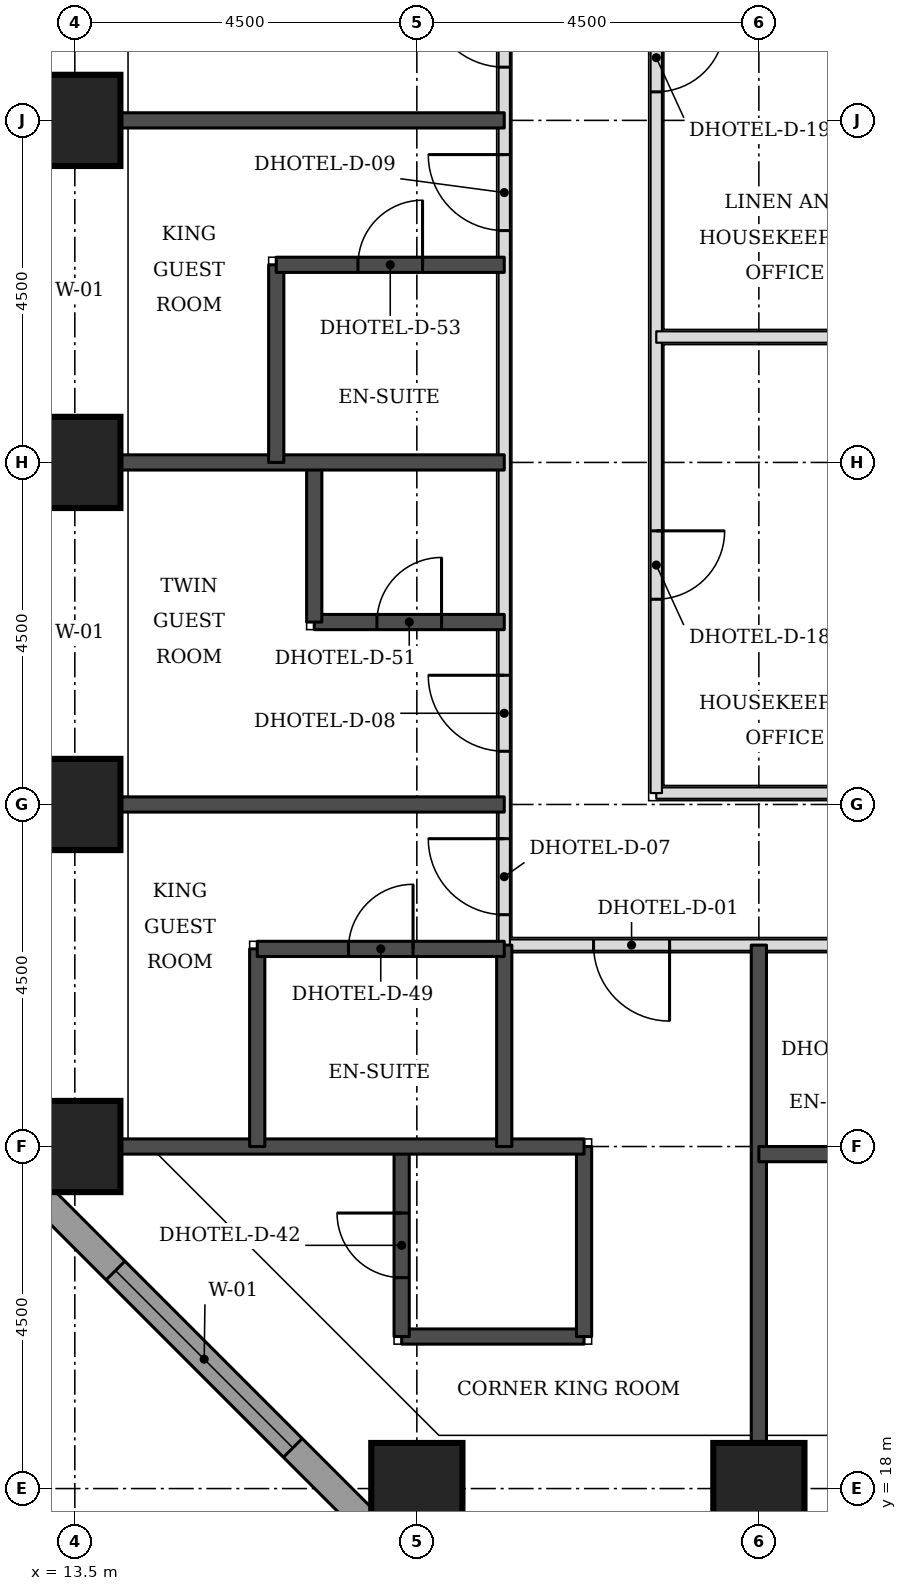
"""IFC4 building model, lengths in metres.
Left out: names, types, materials, properties, quantities, classifications, styles, units other than length and angle.
Written with IfcOpenShell. Run it as: python <this file> out.ifc"""

import sys

from ifc_helpers import new_model, si_unit, direction, frame, frame_2d, origin, origin_2d, place, context, subcontext, project, spatial, rectangle, extrude, element, fill, save


model = new_model("IFC4")
c1 = context("Model", 3, precision=1e-05, world=origin(), true_north=direction((0.0, 1.0)))
c2 = subcontext(c1, "Body", "Model", "MODEL_VIEW")
j1 = project(units=[si_unit("LENGTHUNIT", "METRE"), si_unit("PLANEANGLEUNIT", "RADIAN")], contexts=[c1])
p1 = place(None, origin())
s1 = spatial("IfcSite", under=j1, at=p1, CompositionType="ELEMENT")
p2 = place(p1, origin())
s2 = spatial("IfcBuilding", under=s1, at=p2, CompositionType="ELEMENT")
p3 = place(p2, frame((0.0, 0.0, 36.3)))
s3 = spatial("IfcBuildingStorey", under=s2, at=p3, CompositionType="ELEMENT", Elevation=36.3)
for number, where, z_axis, x_axis in (
    (1, (18.0, 18.0, 0.0), (0.0, 0.0, 1.0), (1.0, 0.0, 0.0)),
    (2, (22.5, 18.0, 0.0), (0.0, 0.0, 1.0), (1.0, 0.0, 0.0)),
    (3, (13.5, 22.5, 0.0), (0.0, 0.0, 1.0), (1.0, 0.0, 0.0)),
    (4, (13.5, 27.0, 0.0), (0.0, 0.0, 1.0), (1.0, 0.0, 0.0)),
    (5, (13.5, 31.5, 0.0), (0.0, 0.0, 1.0), (1.0, 0.0, 0.0)),
    (6, (13.5, 36.0, 0.0), (0.0, 0.0, 1.0), (1.0, 0.0, 0.0)),
):
    element("IfcColumn", number, at=place(p3, frame(where, z_axis=z_axis, x_axis=x_axis)), inside=s3, PredefinedType="COLUMN", context=c2, shape_type="SweptSolid", body=[
        extrude(rectangle(XDim=1.2, YDim=1.2, at=origin_2d()), origin(), (0.0, 0.0, 1.0), 3.3),
    ])
p4 = place(p3, frame((12.674, 22.23, 0.0), z_axis=(0.0, 0.0, 1.0), x_axis=(0.707106781187, -0.707106781187, 0.0)))
e7 = element("IfcWall", 7, at=p4, inside=s3, PredefinedType="STANDARD", context=c2, shape_type="SweptSolid", body=[
    extrude(rectangle(XDim=7.151, YDim=0.35, at=frame_2d((3.576, 0.0))), origin(), (0.0, 0.0, 1.0), 3.055),
])
p5 = place(p4, frame((1.926, 0.0, 0.8)))
e8 = element("IfcOpeningElement", 8, at=p5, cuts=e7, PredefinedType="OPENING", context=c2, shape_type="SweptSolid", body=[
    extrude(rectangle(XDim=3.3, YDim=1.5, at=frame_2d((1.65, 0.75))), frame((0.0, 0.185, 0.0), z_axis=(0.0, -1.0, 0.0), x_axis=(1.0, 0.0, 0.0)), (0.0, 0.0, 1.0), 0.37),
])
p6 = place(p3, frame((19.15, 25.15, 0.0), z_axis=(0.0, 0.0, 1.0), x_axis=(1.0, 0.0, 0.0)))
e9 = element("IfcWall", 9, at=p6, inside=s3, PredefinedType="PARTITIONING", context=c2, shape_type="SweptSolid", body=[
    extrude(rectangle(XDim=32.35, YDim=0.15, at=frame_2d((16.175, 0.0))), origin(), (0.0, 0.0, 1.0), 3.08),
])
p7 = place(p6, frame((6.4, 0.0, 0.0)))
e10 = element("IfcOpeningElement", 10, at=p7, cuts=e9, PredefinedType="OPENING", context=c2, shape_type="SweptSolid", body=[
    extrude(rectangle(XDim=1.0, YDim=2.1, at=frame_2d((0.5, 1.05))), frame((0.0, 0.085, 0.0), z_axis=(0.0, -1.0, 0.0), x_axis=(1.0, 0.0, 0.0)), (0.0, 0.0, 1.0), 0.17),
])
p8 = place(p6, frame((10.5, 0.0, 0.0)))
e11 = element("IfcOpeningElement", 11, at=p8, cuts=e9, PredefinedType="OPENING", context=c2, shape_type="SweptSolid", body=[
    extrude(rectangle(XDim=1.0, YDim=2.1, at=frame_2d((0.5, 1.05))), frame((0.0, 0.085, 0.0), z_axis=(0.0, -1.0, 0.0), x_axis=(1.0, 0.0, 0.0)), (0.0, 0.0, 1.0), 0.17),
])
p9 = place(p6, frame((22.45, 0.0, 0.0)))
e12 = element("IfcOpeningElement", 12, at=p9, cuts=e9, PredefinedType="OPENING", context=c2, shape_type="SweptSolid", body=[
    extrude(rectangle(XDim=1.0, YDim=2.1, at=frame_2d((0.5, 1.05))), frame((0.0, 0.085, 0.0), z_axis=(0.0, -1.0, 0.0), x_axis=(1.0, 0.0, 0.0)), (0.0, 0.0, 1.0), 0.17),
])
p10 = place(p6, frame((26.55, 0.0, 0.0)))
e13 = element("IfcOpeningElement", 13, at=p10, cuts=e9, PredefinedType="OPENING", context=c2, shape_type="SweptSolid", body=[
    extrude(rectangle(XDim=1.0, YDim=2.1, at=frame_2d((0.5, 1.05))), frame((0.0, 0.085, 0.0), z_axis=(0.0, -1.0, 0.0), x_axis=(1.0, 0.0, 0.0)), (0.0, 0.0, 1.0), 0.17),
])
p11 = place(p6, frame((1.175, 0.0, 0.0)))
e14 = element("IfcOpeningElement", 14, at=p11, cuts=e9, PredefinedType="OPENING", context=c2, shape_type="SweptSolid", body=[
    extrude(rectangle(XDim=1.0, YDim=2.1, at=frame_2d((0.5, 1.05))), frame((0.0, 0.085, 0.0), z_axis=(0.0, -1.0, 0.0), x_axis=(1.0, 0.0, 0.0)), (0.0, 0.0, 1.0), 0.17),
])
p12 = place(p6, frame((30.85, 0.0, 0.0)))
e15 = element("IfcOpeningElement", 15, at=p12, cuts=e9, PredefinedType="OPENING", context=c2, shape_type="SweptSolid", body=[
    extrude(rectangle(XDim=1.0, YDim=2.1, at=frame_2d((0.5, 1.05))), frame((0.0, 0.085, 0.0), z_axis=(0.0, -1.0, 0.0), x_axis=(1.0, 0.0, 0.0)), (0.0, 0.0, 1.0), 0.17),
])
p13 = place(p3, frame((19.15, 25.15, 0.0), z_axis=(0.0, 0.0, 1.0), x_axis=(0.0, 1.0, 0.0)))
e16 = element("IfcWall", 16, at=p13, inside=s3, PredefinedType="PARTITIONING", context=c2, shape_type="SweptSolid", body=[
    extrude(rectangle(XDim=24.35, YDim=0.15, at=frame_2d((12.175, 0.0))), origin(), (0.0, 0.0, 1.0), 3.08),
])
p14 = place(p13, frame((0.4, 0.0, 0.0)))
e17 = element("IfcOpeningElement", 17, at=p14, cuts=e16, PredefinedType="OPENING", context=c2, shape_type="SweptSolid", body=[
    extrude(rectangle(XDim=1.0, YDim=2.1, at=frame_2d((0.5, 1.05))), frame((0.0, 0.085, 0.0), z_axis=(0.0, -1.0, 0.0), x_axis=(1.0, 0.0, 0.0)), (0.0, 0.0, 1.0), 0.17),
])
p15 = place(p13, frame((2.55, 0.0, 0.0)))
e18 = element("IfcOpeningElement", 18, at=p15, cuts=e16, PredefinedType="OPENING", context=c2, shape_type="SweptSolid", body=[
    extrude(rectangle(XDim=1.0, YDim=2.1, at=frame_2d((0.5, 1.05))), frame((0.0, 0.085, 0.0), z_axis=(0.0, -1.0, 0.0), x_axis=(1.0, 0.0, 0.0)), (0.0, 0.0, 1.0), 0.17),
])
p16 = place(p13, frame((9.4, 0.0, 0.0)))
e19 = element("IfcOpeningElement", 19, at=p16, cuts=e16, PredefinedType="OPENING", context=c2, shape_type="SweptSolid", body=[
    extrude(rectangle(XDim=1.0, YDim=2.1, at=frame_2d((0.5, 1.05))), frame((0.0, 0.085, 0.0), z_axis=(0.0, -1.0, 0.0), x_axis=(1.0, 0.0, 0.0)), (0.0, 0.0, 1.0), 0.17),
])
p17 = place(p13, frame((11.55, 0.0, 0.0)))
e20 = element("IfcOpeningElement", 20, at=p17, cuts=e16, PredefinedType="OPENING", context=c2, shape_type="SweptSolid", body=[
    extrude(rectangle(XDim=1.0, YDim=2.1, at=frame_2d((0.5, 1.05))), frame((0.0, 0.085, 0.0), z_axis=(0.0, -1.0, 0.0), x_axis=(1.0, 0.0, 0.0)), (0.0, 0.0, 1.0), 0.17),
])
p18 = place(p13, frame((18.4, 0.0, 0.0)))
e21 = element("IfcOpeningElement", 21, at=p18, cuts=e16, PredefinedType="OPENING", context=c2, shape_type="SweptSolid", body=[
    extrude(rectangle(XDim=1.0, YDim=2.1, at=frame_2d((0.5, 1.05))), frame((0.0, 0.085, 0.0), z_axis=(0.0, -1.0, 0.0), x_axis=(1.0, 0.0, 0.0)), (0.0, 0.0, 1.0), 0.17),
])
p19 = place(p13, frame((20.55, 0.0, 0.0)))
e22 = element("IfcOpeningElement", 22, at=p19, cuts=e16, PredefinedType="OPENING", context=c2, shape_type="SweptSolid", body=[
    extrude(rectangle(XDim=1.0, YDim=2.1, at=frame_2d((0.5, 1.05))), frame((0.0, 0.085, 0.0), z_axis=(0.0, -1.0, 0.0), x_axis=(1.0, 0.0, 0.0)), (0.0, 0.0, 1.0), 0.17),
])
p20 = place(p3, frame((21.15, 27.15, 0.0), z_axis=(0.0, 0.0, 1.0), x_axis=(1.0, 0.0, 0.0)))
e23 = element("IfcWall", 23, at=p20, inside=s3, PredefinedType="PARTITIONING", context=c2, shape_type="SweptSolid", body=[
    extrude(rectangle(XDim=3.45, YDim=0.15, at=frame_2d((1.725, 0.0))), origin(), (0.0, 0.0, 1.0), 3.08),
])
p21 = place(p3, frame((21.15, 27.15, 0.0), z_axis=(0.0, 0.0, 1.0), x_axis=(0.0, 1.0, 0.0)))
e24 = element("IfcWall", 24, at=p21, inside=s3, PredefinedType="PARTITIONING", context=c2, shape_type="SweptSolid", body=[
    extrude(rectangle(XDim=15.85, YDim=0.15, at=frame_2d((7.925, 0.0))), origin(), (0.0, 0.0, 1.0), 3.08),
])
p22 = place(p21, frame((2.55, 0.0, 0.0)))
e25 = element("IfcOpeningElement", 25, at=p22, cuts=e24, PredefinedType="OPENING", context=c2, shape_type="SweptSolid", body=[
    extrude(rectangle(XDim=0.9, YDim=2.1, at=frame_2d((0.45, 1.05))), frame((0.0, 0.085, 0.0), z_axis=(0.0, -1.0, 0.0), x_axis=(1.0, 0.0, 0.0)), (0.0, 0.0, 1.0), 0.17),
])
p23 = place(p21, frame((9.225, 0.0, 0.0)))
e26 = element("IfcOpeningElement", 26, at=p23, cuts=e24, PredefinedType="OPENING", context=c2, shape_type="SweptSolid", body=[
    extrude(rectangle(XDim=0.9, YDim=2.1, at=frame_2d((0.45, 1.05))), frame((0.0, 0.085, 0.0), z_axis=(0.0, -1.0, 0.0), x_axis=(1.0, 0.0, 0.0)), (0.0, 0.0, 1.0), 0.17),
])
p24 = place(p3, frame((22.5, 18.6, 0.0), z_axis=(0.0, 0.0, 1.0), x_axis=(0.0, 1.0, 0.0)))
e27 = element("IfcWall", 27, at=p24, inside=s3, PredefinedType="SOLIDWALL", context=c2, shape_type="SweptSolid", body=[
    extrude(rectangle(XDim=6.55, YDim=0.2, at=frame_2d((3.275, 0.0))), origin(), (0.0, 0.0, 1.0), 3.08),
])
p25 = place(p3, frame((17.8, 20.0, 0.0), z_axis=(0.0, 0.0, 1.0), x_axis=(1.0, 0.0, 0.0)))
e28 = element("IfcWall", 28, at=p25, inside=s3, PredefinedType="SOLIDWALL", context=c2, shape_type="SweptSolid", body=[
    extrude(rectangle(XDim=2.4, YDim=0.2, at=frame_2d((1.2, 0.0))), origin(), (0.0, 0.0, 1.0), 3.08),
])
p26 = place(p3, frame((17.8, 20.0, 0.0), z_axis=(0.0, 0.0, 1.0), x_axis=(0.0, 1.0, 0.0)))
e29 = element("IfcWall", 29, at=p26, inside=s3, PredefinedType="SOLIDWALL", context=c2, shape_type="SweptSolid", body=[
    extrude(rectangle(XDim=2.5, YDim=0.2, at=frame_2d((1.25, 0.0))), origin(), (0.0, 0.0, 1.0), 3.08),
])
p27 = place(p26, frame((0.775, 0.0, 0.0)))
e30 = element("IfcOpeningElement", 30, at=p27, cuts=e29, PredefinedType="OPENING", context=c2, shape_type="SweptSolid", body=[
    extrude(rectangle(XDim=0.85, YDim=2.1, at=frame_2d((0.425, 1.05))), frame((0.0, 0.11, 0.0), z_axis=(0.0, -1.0, 0.0), x_axis=(1.0, 0.0, 0.0)), (0.0, 0.0, 1.0), 0.22),
])
p28 = place(p3, frame((20.2, 20.0, 0.0), z_axis=(0.0, 0.0, 1.0), x_axis=(0.0, 1.0, 0.0)))
e31 = element("IfcWall", 31, at=p28, inside=s3, PredefinedType="SOLIDWALL", context=c2, shape_type="SweptSolid", body=[
    extrude(rectangle(XDim=2.5, YDim=0.2, at=frame_2d((1.25, 0.0))), origin(), (0.0, 0.0, 1.0), 3.08),
])
p29 = place(p3, frame((22.5, 22.4, 0.0), z_axis=(0.0, 0.0, 1.0), x_axis=(1.0, 0.0, 0.0)))
e32 = element("IfcWall", 32, at=p29, inside=s3, PredefinedType="SOLIDWALL", context=c2, shape_type="SweptSolid", body=[
    extrude(rectangle(XDim=2.6, YDim=0.2, at=frame_2d((1.3, 0.0))), origin(), (0.0, 0.0, 1.0), 3.08),
])
p30 = place(p3, frame((14.1, 22.5, 0.0), z_axis=(0.0, 0.0, 1.0), x_axis=(1.0, 0.0, 0.0)))
e33 = element("IfcWall", 33, at=p30, inside=s3, PredefinedType="SOLIDWALL", context=c2, shape_type="SweptSolid", body=[
    extrude(rectangle(XDim=6.1, YDim=0.2, at=frame_2d((3.05, 0.0))), origin(), (0.0, 0.0, 1.0), 3.08),
])
p31 = place(p3, frame((15.9, 22.5, 0.0), z_axis=(0.0, 0.0, 1.0), x_axis=(0.0, 1.0, 0.0)))
e34 = element("IfcWall", 34, at=p31, inside=s3, PredefinedType="SOLIDWALL", context=c2, shape_type="SweptSolid", body=[
    extrude(rectangle(XDim=2.6, YDim=0.2, at=frame_2d((1.3, 0.0))), origin(), (0.0, 0.0, 1.0), 3.08),
])
p32 = place(p3, frame((19.15, 22.5, 0.0), z_axis=(0.0, 0.0, 1.0), x_axis=(0.0, 1.0, 0.0)))
e35 = element("IfcWall", 35, at=p32, inside=s3, PredefinedType="SOLIDWALL", context=c2, shape_type="SweptSolid", body=[
    extrude(rectangle(XDim=2.65, YDim=0.2, at=frame_2d((1.325, 0.0))), origin(), (0.0, 0.0, 1.0), 3.08),
])
p33 = place(p3, frame((15.9, 25.1, 0.0), z_axis=(0.0, 0.0, 1.0), x_axis=(1.0, 0.0, 0.0)))
e36 = element("IfcWall", 36, at=p33, inside=s3, PredefinedType="SOLIDWALL", context=c2, shape_type="SweptSolid", body=[
    extrude(rectangle(XDim=3.25, YDim=0.2, at=frame_2d((1.625, 0.0))), origin(), (0.0, 0.0, 1.0), 3.08),
])
p34 = place(p33, frame((1.2, 0.0, 0.0)))
e37 = element("IfcOpeningElement", 37, at=p34, cuts=e36, PredefinedType="OPENING", context=c2, shape_type="SweptSolid", body=[
    extrude(rectangle(XDim=0.85, YDim=2.1, at=frame_2d((0.425, 1.05))), frame((0.0, 0.11, 0.0), z_axis=(0.0, -1.0, 0.0), x_axis=(1.0, 0.0, 0.0)), (0.0, 0.0, 1.0), 0.22),
])
p35 = place(p3, frame((14.1, 27.0, 0.0), z_axis=(0.0, 0.0, 1.0), x_axis=(1.0, 0.0, 0.0)))
e38 = element("IfcWall", 38, at=p35, inside=s3, PredefinedType="SOLIDWALL", context=c2, shape_type="SweptSolid", body=[
    extrude(rectangle(XDim=5.05, YDim=0.2, at=frame_2d((2.525, 0.0))), origin(), (0.0, 0.0, 1.0), 3.08),
])
p36 = place(p3, frame((16.65, 29.4, 0.0), z_axis=(0.0, 0.0, 1.0), x_axis=(1.0, 0.0, 0.0)))
e39 = element("IfcWall", 39, at=p36, inside=s3, PredefinedType="SOLIDWALL", context=c2, shape_type="SweptSolid", body=[
    extrude(rectangle(XDim=2.5, YDim=0.2, at=frame_2d((1.25, 0.0))), origin(), (0.0, 0.0, 1.0), 3.08),
])
p37 = place(p36, frame((0.825, 0.0, 0.0)))
e40 = element("IfcOpeningElement", 40, at=p37, cuts=e39, PredefinedType="OPENING", context=c2, shape_type="SweptSolid", body=[
    extrude(rectangle(XDim=0.85, YDim=2.1, at=frame_2d((0.425, 1.05))), frame((0.0, 0.11, 0.0), z_axis=(0.0, -1.0, 0.0), x_axis=(1.0, 0.0, 0.0)), (0.0, 0.0, 1.0), 0.22),
])
p38 = place(p3, frame((16.65, 29.4, 0.0), z_axis=(0.0, 0.0, 1.0), x_axis=(0.0, 1.0, 0.0)))
e41 = element("IfcWall", 41, at=p38, inside=s3, PredefinedType="SOLIDWALL", context=c2, shape_type="SweptSolid", body=[
    extrude(rectangle(XDim=2.1, YDim=0.2, at=frame_2d((1.05, 0.0))), origin(), (0.0, 0.0, 1.0), 3.08),
])
p39 = place(p3, frame((14.1, 31.5, 0.0), z_axis=(0.0, 0.0, 1.0), x_axis=(1.0, 0.0, 0.0)))
e42 = element("IfcWall", 42, at=p39, inside=s3, PredefinedType="SOLIDWALL", context=c2, shape_type="SweptSolid", body=[
    extrude(rectangle(XDim=5.05, YDim=0.2, at=frame_2d((2.525, 0.0))), origin(), (0.0, 0.0, 1.0), 3.08),
])
p40 = place(p3, frame((16.15, 31.5, 0.0), z_axis=(0.0, 0.0, 1.0), x_axis=(0.0, 1.0, 0.0)))
e43 = element("IfcWall", 43, at=p40, inside=s3, PredefinedType="SOLIDWALL", context=c2, shape_type="SweptSolid", body=[
    extrude(rectangle(XDim=2.6, YDim=0.2, at=frame_2d((1.3, 0.0))), origin(), (0.0, 0.0, 1.0), 3.08),
])
p41 = place(p3, frame((16.15, 34.1, 0.0), z_axis=(0.0, 0.0, 1.0), x_axis=(1.0, 0.0, 0.0)))
e44 = element("IfcWall", 44, at=p41, inside=s3, PredefinedType="SOLIDWALL", context=c2, shape_type="SweptSolid", body=[
    extrude(rectangle(XDim=3.0, YDim=0.2, at=frame_2d((1.5, 0.0))), origin(), (0.0, 0.0, 1.0), 3.08),
])
p42 = place(p41, frame((1.075, 0.0, 0.0)))
e45 = element("IfcOpeningElement", 45, at=p42, cuts=e44, PredefinedType="OPENING", context=c2, shape_type="SweptSolid", body=[
    extrude(rectangle(XDim=0.85, YDim=2.1, at=frame_2d((0.425, 1.05))), frame((0.0, 0.11, 0.0), z_axis=(0.0, -1.0, 0.0), x_axis=(1.0, 0.0, 0.0)), (0.0, 0.0, 1.0), 0.22),
])
p43 = place(p3, frame((14.1, 36.0, 0.0), z_axis=(0.0, 0.0, 1.0), x_axis=(1.0, 0.0, 0.0)))
e46 = element("IfcWall", 46, at=p43, inside=s3, PredefinedType="SOLIDWALL", context=c2, shape_type="SweptSolid", body=[
    extrude(rectangle(XDim=5.05, YDim=0.2, at=frame_2d((2.525, 0.0))), origin(), (0.0, 0.0, 1.0), 3.08),
])
p44 = place(p3, frame((21.15, 33.15, 0.0), z_axis=(0.0, 0.0, 1.0), x_axis=(1.0, 0.0, 0.0)))
e47 = element("IfcWall", 47, at=p44, inside=s3, PredefinedType="PARTITIONING", context=c2, shape_type="SweptSolid", body=[
    extrude(rectangle(XDim=3.45, YDim=0.15, at=frame_2d((1.725, 0.0))), origin(), (0.0, 0.0, 1.0), 3.08),
])
p45 = place(p5, origin())
e48 = element("IfcWindow", 48, at=p45, inside=s3, PartitioningType="SINGLE_PANEL", PredefinedType="WINDOW", context=c2, shape_type="SweptSolid", body=[
    extrude(rectangle(XDim=3.3, YDim=1.5, at=frame_2d((1.65, 0.75))), frame((0.0, 0.085, 0.0), z_axis=(0.0, -1.0, 0.0), x_axis=(1.0, 0.0, 0.0)), (0.0, 0.0, 1.0), 0.06),
])
fill(e8, e48)
p46 = place(p14, origin())
e49 = element("IfcDoor", 49, at=p46, inside=s3, OperationType="SINGLE_SWING_RIGHT", PredefinedType="DOOR", context=c2, shape_type="SweptSolid", body=[
    extrude(rectangle(XDim=1.0, YDim=2.1, at=frame_2d((0.5, 1.05))), frame((0.0, 0.025, 0.0), z_axis=(0.0, -1.0, 0.0), x_axis=(1.0, 0.0, 0.0)), (0.0, 0.0, 1.0), 0.05),
])
fill(e17, e49)
p47 = place(p34, origin())
e50 = element("IfcDoor", 50, at=p47, inside=s3, OperationType="SINGLE_SWING_RIGHT", PredefinedType="DOOR", context=c2, shape_type="SweptSolid", body=[
    extrude(rectangle(XDim=0.85, YDim=2.1, at=frame_2d((0.425, 1.05))), frame((0.0, 0.025, 0.0), z_axis=(0.0, -1.0, 0.0), x_axis=(1.0, 0.0, 0.0)), (0.0, 0.0, 1.0), 0.05),
])
fill(e37, e50)
p48 = place(p15, origin())
e51 = element("IfcDoor", 51, at=p48, inside=s3, OperationType="SINGLE_SWING_RIGHT", PredefinedType="DOOR", context=c2, shape_type="SweptSolid", body=[
    extrude(rectangle(XDim=1.0, YDim=2.1, at=frame_2d((0.5, 1.05))), frame((0.0, 0.025, 0.0), z_axis=(0.0, -1.0, 0.0), x_axis=(1.0, 0.0, 0.0)), (0.0, 0.0, 1.0), 0.05),
])
fill(e18, e51)
p49 = place(p37, origin())
e52 = element("IfcDoor", 52, at=p49, inside=s3, OperationType="SINGLE_SWING_RIGHT", PredefinedType="DOOR", context=c2, shape_type="SweptSolid", body=[
    extrude(rectangle(XDim=0.85, YDim=2.1, at=frame_2d((0.425, 1.05))), frame((0.0, 0.025, 0.0), z_axis=(0.0, -1.0, 0.0), x_axis=(1.0, 0.0, 0.0)), (0.0, 0.0, 1.0), 0.05),
])
fill(e40, e52)
p50 = place(p16, origin())
e53 = element("IfcDoor", 53, at=p50, inside=s3, OperationType="SINGLE_SWING_RIGHT", PredefinedType="DOOR", context=c2, shape_type="SweptSolid", body=[
    extrude(rectangle(XDim=1.0, YDim=2.1, at=frame_2d((0.5, 1.05))), frame((0.0, 0.025, 0.0), z_axis=(0.0, -1.0, 0.0), x_axis=(1.0, 0.0, 0.0)), (0.0, 0.0, 1.0), 0.05),
])
fill(e19, e53)
p51 = place(p42, origin())
e54 = element("IfcDoor", 54, at=p51, inside=s3, OperationType="SINGLE_SWING_RIGHT", PredefinedType="DOOR", context=c2, shape_type="SweptSolid", body=[
    extrude(rectangle(XDim=0.85, YDim=2.1, at=frame_2d((0.425, 1.05))), frame((0.0, 0.025, 0.0), z_axis=(0.0, -1.0, 0.0), x_axis=(1.0, 0.0, 0.0)), (0.0, 0.0, 1.0), 0.05),
])
fill(e45, e54)
p52 = place(p17, origin())
e55 = element("IfcDoor", 55, at=p52, inside=s3, OperationType="SINGLE_SWING_RIGHT", PredefinedType="DOOR", context=c2, shape_type="SweptSolid", body=[
    extrude(rectangle(XDim=1.0, YDim=2.1, at=frame_2d((0.5, 1.05))), frame((0.0, 0.025, 0.0), z_axis=(0.0, -1.0, 0.0), x_axis=(1.0, 0.0, 0.0)), (0.0, 0.0, 1.0), 0.05),
])
fill(e20, e55)
p53 = place(p11, frame((1.0, 0.0, 0.0), z_axis=(0.0, 0.0, 1.0), x_axis=(-1.0, 0.0, 0.0)))
e56 = element("IfcDoor", 56, at=p53, inside=s3, OperationType="SINGLE_SWING_LEFT", PredefinedType="DOOR", context=c2, shape_type="SweptSolid", body=[
    extrude(rectangle(XDim=1.0, YDim=2.1, at=frame_2d((0.5, 1.05))), frame((0.0, 0.025, 0.0), z_axis=(0.0, -1.0, 0.0), x_axis=(1.0, 0.0, 0.0)), (0.0, 0.0, 1.0), 0.05),
])
fill(e14, e56)
p54 = place(p27, origin())
e57 = element("IfcDoor", 57, at=p54, inside=s3, OperationType="SINGLE_SWING_RIGHT", PredefinedType="DOOR", context=c2, shape_type="SweptSolid", body=[
    extrude(rectangle(XDim=0.85, YDim=2.1, at=frame_2d((0.425, 1.05))), frame((0.0, 0.025, 0.0), z_axis=(0.0, -1.0, 0.0), x_axis=(1.0, 0.0, 0.0)), (0.0, 0.0, 1.0), 0.05),
])
fill(e30, e57)
p55 = place(p22, frame((0.9, 0.0, 0.0), z_axis=(0.0, 0.0, 1.0), x_axis=(-1.0, 0.0, 0.0)))
e58 = element("IfcDoor", 58, at=p55, inside=s3, OperationType="SINGLE_SWING_LEFT", PredefinedType="DOOR", context=c2, shape_type="SweptSolid", body=[
    extrude(rectangle(XDim=0.9, YDim=2.1, at=frame_2d((0.45, 1.05))), frame((0.0, 0.025, 0.0), z_axis=(0.0, -1.0, 0.0), x_axis=(1.0, 0.0, 0.0)), (0.0, 0.0, 1.0), 0.05),
])
fill(e25, e58)
p56 = place(p23, frame((0.9, 0.0, 0.0), z_axis=(0.0, 0.0, 1.0), x_axis=(-1.0, 0.0, 0.0)))
e59 = element("IfcDoor", 59, at=p56, inside=s3, OperationType="SINGLE_SWING_LEFT", PredefinedType="DOOR", context=c2, shape_type="SweptSolid", body=[
    extrude(rectangle(XDim=0.9, YDim=2.1, at=frame_2d((0.45, 1.05))), frame((0.0, 0.025, 0.0), z_axis=(0.0, -1.0, 0.0), x_axis=(1.0, 0.0, 0.0)), (0.0, 0.0, 1.0), 0.05),
])
fill(e26, e59)
save(model, sys.argv[1])
